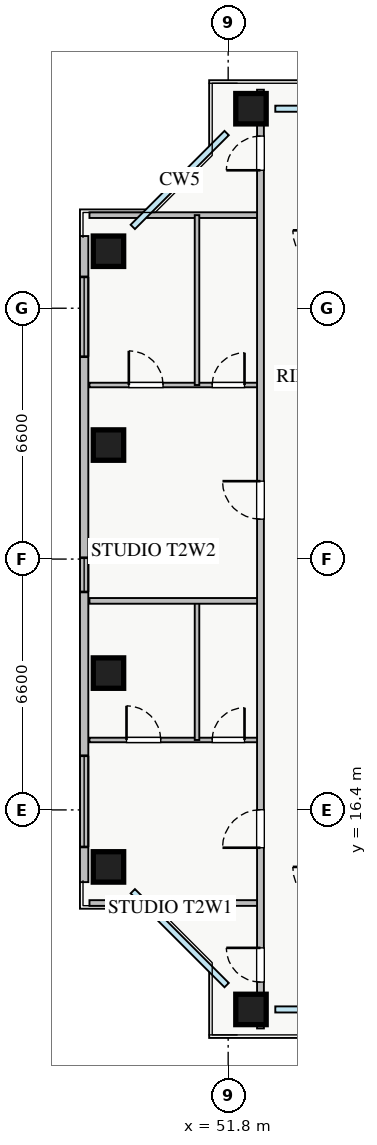
"""IFC4 building model, lengths in metres.
Left out: names, types, materials, properties, quantities, classifications, styles, units other than length and angle.
Written with IfcOpenShell. Run it as: python <this file> out.ifc"""

import sys

from ifc_helpers import new_model, si_unit, direction, frame, frame_2d, origin, origin_2d, place, context, subcontext, project, spatial, rectangle, extrude, source, transform, mapped, element, fill, save


model = new_model("IFC4")
c1 = context("Model", 3, precision=1e-05, world=origin(), true_north=direction((0.0, 1.0)))
c2 = subcontext(c1, "Body", "Model", "MODEL_VIEW")
j1 = project(units=[si_unit("LENGTHUNIT", "METRE"), si_unit("PLANEANGLEUNIT", "RADIAN")], contexts=[c1])
p1 = place(None, origin())
s1 = spatial("IfcSite", under=j1, at=p1, CompositionType="ELEMENT")
p2 = place(p1, origin())
s2 = spatial("IfcBuilding", under=s1, at=p2, CompositionType="ELEMENT")
p3 = place(p2, frame((0.0, 0.0, 106.75)))
s3 = spatial("IfcBuildingStorey", under=s2, at=p3, CompositionType="ELEMENT", Elevation=106.75)
m1 = source(origin(), c2, "Body", "SweptSolid", [
    extrude(rectangle(XDim=0.8, YDim=0.8, at=origin_2d()), origin(), (0.0, 0.0, 1.0), 3.25),
])
for number, where, z_axis, x_axis in (
    (1, (52.4, 11.15, 0.0), (0.0, 0.0, 1.0), (1.0, 0.0, 0.0)),
    (2, (52.4, 34.85, 0.0), (0.0, 0.0, 1.0), (1.0, 0.0, 0.0)),
    (3, (48.65, 14.9, 0.0), (0.0, 0.0, 1.0), (1.0, 0.0, 0.0)),
    (4, (48.65, 20.0, 0.0), (0.0, 0.0, 1.0), (1.0, 0.0, 0.0)),
    (5, (48.65, 26.0, 0.0), (0.0, 0.0, 1.0), (1.0, 0.0, 0.0)),
    (6, (48.65, 31.1, 0.0), (0.0, 0.0, 1.0), (1.0, 0.0, 0.0)),
):
    element("IfcColumn", number, at=place(p3, frame(where, z_axis=z_axis, x_axis=x_axis)), inside=s3, PredefinedType="COLUMN", context=c2, shape_type="MappedRepresentation", body=[
        mapped(m1, transform((0.0, 0.0, 0.0), x_axis=(1.0, 0.0, 0.0), y_axis=(0.0, 1.0, 0.0), z_axis=(0.0, 0.0, 1.0), scale=1.0)),
    ])
p4 = place(p3, frame((48.01, 14.5, 0.0), z_axis=(0.0, 0.0, 1.0), x_axis=(0.0, 1.0, 0.0)))
e7 = element("IfcWall", 7, at=p4, inside=s3, PredefinedType="STANDARD", context=c2, shape_type="SweptSolid", body=[
    extrude(rectangle(XDim=17.0, YDim=0.22, at=frame_2d((8.5, 0.0))), origin(), (0.0, 0.0, 1.0), 2.61),
])
p5 = place(p4, frame((0.925, 0.0, 0.9)))
e8 = element("IfcOpeningElement", 8, at=p5, cuts=e7, PredefinedType="OPENING", context=c2, shape_type="SweptSolid", body=[
    extrude(rectangle(XDim=2.4, YDim=1.48, at=frame_2d((1.2, 0.74))), frame((0.0, 0.12, 0.0), z_axis=(0.0, -1.0, 0.0), x_axis=(1.0, 0.0, 0.0)), (0.0, 0.0, 1.0), 0.24),
])
p6 = place(p4, frame((13.825, 0.0, 0.9)))
e9 = element("IfcOpeningElement", 9, at=p6, cuts=e7, PredefinedType="OPENING", context=c2, shape_type="SweptSolid", body=[
    extrude(rectangle(XDim=2.1, YDim=1.48, at=frame_2d((1.05, 0.74))), frame((0.0, 0.12, 0.0), z_axis=(0.0, -1.0, 0.0), x_axis=(1.0, 0.0, 0.0)), (0.0, 0.0, 1.0), 0.24),
])
p7 = place(p4, frame((7.635, 0.0, 0.9)))
e10 = element("IfcOpeningElement", 10, at=p7, cuts=e7, PredefinedType="OPENING", context=c2, shape_type="SweptSolid", body=[
    extrude(rectangle(XDim=0.9, YDim=1.2, at=frame_2d((0.45, 0.6))), frame((0.0, 0.12, 0.0), z_axis=(0.0, -1.0, 0.0), x_axis=(1.0, 0.0, 0.0)), (0.0, 0.0, 1.0), 0.24),
])
for number, where, z_axis, x_axis in (
    (11, (48.15, 32.05, 0.0), (0.0, 0.0, 1.0), (1.0, 0.0, 0.0)),
    (12, (48.15, 13.95, 0.0), (0.0, 0.0, 1.0), (1.0, 0.0, 0.0)),
):
    element("IfcWall", number, at=place(p3, frame(where, z_axis=z_axis, x_axis=x_axis)), inside=s3, PredefinedType="PARTITIONING", context=c2, shape_type="SweptSolid", body=[
        extrude(rectangle(XDim=4.5, YDim=0.15, at=frame_2d((2.25, 0.0))), origin(), (0.0, 0.0, 1.0), 3.07),
    ])
p8 = place(p3, frame((48.15, 18.24, 0.0), z_axis=(0.0, 0.0, 1.0), x_axis=(1.0, 0.0, 0.0)))
e13 = element("IfcWall", 13, at=p8, inside=s3, PredefinedType="PLUMBINGWALL", context=c2, shape_type="SweptSolid", body=[
    extrude(rectangle(XDim=4.5, YDim=0.12, at=frame_2d((2.25, 0.0))), origin(), (0.0, 0.0, 1.0), 3.07),
])
p9 = place(p8, frame((0.975, 0.0, 0.0)))
e14 = element("IfcOpeningElement", 14, at=p9, cuts=e13, PredefinedType="OPENING", context=c2, shape_type="SweptSolid", body=[
    extrude(rectangle(XDim=0.9, YDim=2.05, at=frame_2d((0.45, 1.025))), frame((0.0, 0.07, 0.0), z_axis=(0.0, -1.0, 0.0), x_axis=(1.0, 0.0, 0.0)), (0.0, 0.0, 1.0), 0.14),
])
p10 = place(p8, frame((3.23, 0.0, 0.0)))
e15 = element("IfcOpeningElement", 15, at=p10, cuts=e13, PredefinedType="OPENING", context=c2, shape_type="SweptSolid", body=[
    extrude(rectangle(XDim=0.85, YDim=2.05, at=frame_2d((0.425, 1.025))), frame((0.0, 0.07, 0.0), z_axis=(0.0, -1.0, 0.0), x_axis=(1.0, 0.0, 0.0)), (0.0, 0.0, 1.0), 0.14),
])
p11 = place(p3, frame((50.98, 18.24, 0.0), z_axis=(0.0, 0.0, 1.0), x_axis=(0.0, 1.0, 0.0)))
e16 = element("IfcWall", 16, at=p11, inside=s3, PredefinedType="PLUMBINGWALL", context=c2, shape_type="SweptSolid", body=[
    extrude(rectangle(XDim=3.66, YDim=0.12, at=frame_2d((1.83, 0.0))), origin(), (0.0, 0.0, 1.0), 3.07),
])
p12 = place(p3, frame((48.15, 27.58, 0.0), z_axis=(0.0, 0.0, 1.0), x_axis=(1.0, 0.0, 0.0)))
e17 = element("IfcWall", 17, at=p12, inside=s3, PredefinedType="PLUMBINGWALL", context=c2, shape_type="SweptSolid", body=[
    extrude(rectangle(XDim=4.5, YDim=0.12, at=frame_2d((2.25, 0.0))), origin(), (0.0, 0.0, 1.0), 2.815),
])
p13 = place(p12, frame((1.036, 0.0, 0.0)))
e18 = element("IfcOpeningElement", 18, at=p13, cuts=e17, PredefinedType="OPENING", context=c2, shape_type="SweptSolid", body=[
    extrude(rectangle(XDim=0.9, YDim=2.05, at=frame_2d((0.45, 1.025))), frame((0.0, 0.07, 0.0), z_axis=(0.0, -1.0, 0.0), x_axis=(1.0, 0.0, 0.0)), (0.0, 0.0, 1.0), 0.14),
])
p14 = place(p12, frame((3.23, 0.0, 0.0)))
e19 = element("IfcOpeningElement", 19, at=p14, cuts=e17, PredefinedType="OPENING", context=c2, shape_type="SweptSolid", body=[
    extrude(rectangle(XDim=0.85, YDim=2.05, at=frame_2d((0.425, 1.025))), frame((0.0, 0.07, 0.0), z_axis=(0.0, -1.0, 0.0), x_axis=(1.0, 0.0, 0.0)), (0.0, 0.0, 1.0), 0.14),
])
p15 = place(p3, frame((50.98, 27.58, 0.0), z_axis=(0.0, 0.0, 1.0), x_axis=(0.0, 1.0, 0.0)))
e20 = element("IfcWall", 20, at=p15, inside=s3, PredefinedType="PLUMBINGWALL", context=c2, shape_type="SweptSolid", body=[
    extrude(rectangle(XDim=4.47, YDim=0.12, at=frame_2d((2.235, 0.0))), origin(), (0.0, 0.0, 1.0), 3.07),
])
p16 = place(p3, frame((48.15, 21.9, 0.0), z_axis=(0.0, 0.0, 1.0), x_axis=(1.0, 0.0, 0.0)))
e21 = element("IfcWall", 21, at=p16, inside=s3, PredefinedType="PARTITIONING", context=c2, shape_type="SweptSolid", body=[
    extrude(rectangle(XDim=4.5, YDim=0.15, at=frame_2d((2.25, 0.0))), origin(), (0.0, 0.0, 1.0), 3.07),
])
p17 = place(p3, frame((52.65, 10.65, 0.0), z_axis=(0.0, 0.0, 1.0), x_axis=(0.0, 1.0, 0.0)))
e22 = element("IfcWall", 22, at=p17, inside=s3, PredefinedType="PARTITIONING", context=c2, shape_type="SweptSolid", body=[
    extrude(rectangle(XDim=24.7, YDim=0.18, at=frame_2d((12.35, 0.0))), origin(), (0.0, 0.0, 1.0), 2.615),
])
p18 = place(p17, frame((22.58, 0.0, 0.0)))
e23 = element("IfcOpeningElement", 23, at=p18, cuts=e22, PredefinedType="OPENING", context=c2, shape_type="SweptSolid", body=[
    extrude(rectangle(XDim=0.9, YDim=2.05, at=frame_2d((0.45, 1.025))), frame((0.0, 0.1, 0.0), z_axis=(0.0, -1.0, 0.0), x_axis=(1.0, 0.0, 0.0)), (0.0, 0.0, 1.0), 0.2),
])
p19 = place(p17, frame((1.22, 0.0, 0.0)))
e24 = element("IfcOpeningElement", 24, at=p19, cuts=e22, PredefinedType="OPENING", context=c2, shape_type="SweptSolid", body=[
    extrude(rectangle(XDim=0.9, YDim=2.05, at=frame_2d((0.45, 1.025))), frame((0.0, 0.1, 0.0), z_axis=(0.0, -1.0, 0.0), x_axis=(1.0, 0.0, 0.0)), (0.0, 0.0, 1.0), 0.2),
])
p20 = place(p17, frame((4.755, 0.0, 0.0)))
e25 = element("IfcOpeningElement", 25, at=p20, cuts=e22, PredefinedType="OPENING", context=c2, shape_type="SweptSolid", body=[
    extrude(rectangle(XDim=1.0, YDim=2.05, at=frame_2d((0.5, 1.025))), frame((0.0, 0.1, 0.0), z_axis=(0.0, -1.0, 0.0), x_axis=(1.0, 0.0, 0.0)), (0.0, 0.0, 1.0), 0.2),
])
p21 = place(p17, frame((13.4, 0.0, 0.0)))
e26 = element("IfcOpeningElement", 26, at=p21, cuts=e22, PredefinedType="OPENING", context=c2, shape_type="SweptSolid", body=[
    extrude(rectangle(XDim=1.0, YDim=2.05, at=frame_2d((0.5, 1.025))), frame((0.0, 0.1, 0.0), z_axis=(0.0, -1.0, 0.0), x_axis=(1.0, 0.0, 0.0)), (0.0, 0.0, 1.0), 0.2),
])
m2 = source(origin(), c2, "Body", "SweptSolid", [
    extrude(rectangle(XDim=2.4, YDim=1.48, at=frame_2d((1.2, 0.74))), frame((0.0, 0.03, 0.0), z_axis=(0.0, -1.0, 0.0), x_axis=(1.0, 0.0, 0.0)), (0.0, 0.0, 1.0), 0.06),
])
p22 = place(p5, origin())
e27 = element("IfcWindow", 27, at=p22, inside=s3, PartitioningType="TRIPLE_PANEL_VERTICAL", PredefinedType="WINDOW", context=c2, shape_type="MappedRepresentation", body=[
    mapped(m2, transform((0.0, 0.0, 0.0), x_axis=(1.0, 0.0, 0.0), y_axis=(0.0, 1.0, 0.0), z_axis=(0.0, 0.0, 1.0), scale=1.0)),
])
fill(e8, e27)
m3 = source(origin(), c2, "Body", "SweptSolid", [
    extrude(rectangle(XDim=2.1, YDim=1.48, at=frame_2d((1.05, 0.74))), frame((0.0, 0.03, 0.0), z_axis=(0.0, -1.0, 0.0), x_axis=(1.0, 0.0, 0.0)), (0.0, 0.0, 1.0), 0.06),
])
p23 = place(p6, origin())
e28 = element("IfcWindow", 28, at=p23, inside=s3, PartitioningType="TRIPLE_PANEL_VERTICAL", PredefinedType="WINDOW", context=c2, shape_type="MappedRepresentation", body=[
    mapped(m3, transform((0.0, 0.0, 0.0), x_axis=(1.0, 0.0, 0.0), y_axis=(0.0, 1.0, 0.0), z_axis=(0.0, 0.0, 1.0), scale=1.0)),
])
fill(e9, e28)
m4 = source(origin(), c2, "Body", "SweptSolid", [
    extrude(rectangle(XDim=0.9, YDim=2.05, at=frame_2d((0.45, 1.025))), frame((0.0, 0.025, 0.0), z_axis=(0.0, -1.0, 0.0), x_axis=(1.0, 0.0, 0.0)), (0.0, 0.0, 1.0), 0.05),
])
p24 = place(p9, origin())
e29 = element("IfcDoor", 29, at=p24, inside=s3, OperationType="SINGLE_SWING_LEFT", PredefinedType="DOOR", context=c2, shape_type="MappedRepresentation", body=[
    mapped(m4, transform((0.0, 0.0, 0.0), x_axis=(1.0, 0.0, 0.0), y_axis=(0.0, 1.0, 0.0), z_axis=(0.0, 0.0, 1.0), scale=1.0)),
])
fill(e14, e29)
m5 = source(origin(), c2, "Body", "SweptSolid", [
    extrude(rectangle(XDim=0.85, YDim=2.05, at=frame_2d((0.425, 1.025))), frame((0.0, 0.025, 0.0), z_axis=(0.0, -1.0, 0.0), x_axis=(1.0, 0.0, 0.0)), (0.0, 0.0, 1.0), 0.05),
])
p25 = place(p10, origin())
e30 = element("IfcDoor", 30, at=p25, inside=s3, OperationType="SINGLE_SWING_RIGHT", PredefinedType="DOOR", context=c2, shape_type="MappedRepresentation", body=[
    mapped(m5, transform((0.0, 0.0, 0.0), x_axis=(1.0, 0.0, 0.0), y_axis=(0.0, 1.0, 0.0), z_axis=(0.0, 0.0, 1.0), scale=1.0)),
])
fill(e15, e30)
p26 = place(p13, origin())
e31 = element("IfcDoor", 31, at=p26, inside=s3, OperationType="SINGLE_SWING_LEFT", PredefinedType="DOOR", context=c2, shape_type="MappedRepresentation", body=[
    mapped(m4, transform((0.0, 0.0, 0.0), x_axis=(1.0, 0.0, 0.0), y_axis=(0.0, 1.0, 0.0), z_axis=(0.0, 0.0, 1.0), scale=1.0)),
])
fill(e18, e31)
p27 = place(p14, origin())
e32 = element("IfcDoor", 32, at=p27, inside=s3, OperationType="SINGLE_SWING_RIGHT", PredefinedType="DOOR", context=c2, shape_type="MappedRepresentation", body=[
    mapped(m5, transform((0.0, 0.0, 0.0), x_axis=(1.0, 0.0, 0.0), y_axis=(0.0, 1.0, 0.0), z_axis=(0.0, 0.0, 1.0), scale=1.0)),
])
fill(e19, e32)
p28 = place(p18, origin())
e33 = element("IfcDoor", 33, at=p28, inside=s3, OperationType="SINGLE_SWING_LEFT", PredefinedType="DOOR", context=c2, shape_type="MappedRepresentation", body=[
    mapped(m4, transform((0.0, 0.0, 0.0), x_axis=(1.0, 0.0, 0.0), y_axis=(0.0, 1.0, 0.0), z_axis=(0.0, 0.0, 1.0), scale=1.0)),
])
fill(e23, e33)
p29 = place(p19, origin())
e34 = element("IfcDoor", 34, at=p29, inside=s3, OperationType="SINGLE_SWING_RIGHT", PredefinedType="DOOR", context=c2, shape_type="MappedRepresentation", body=[
    mapped(m4, transform((0.0, 0.0, 0.0), x_axis=(1.0, 0.0, 0.0), y_axis=(0.0, 1.0, 0.0), z_axis=(0.0, 0.0, 1.0), scale=1.0)),
])
fill(e24, e34)
m6 = source(origin(), c2, "Body", "SweptSolid", [
    extrude(rectangle(XDim=1.0, YDim=2.05, at=frame_2d((0.5, 1.025))), frame((0.0, 0.025, 0.0), z_axis=(0.0, -1.0, 0.0), x_axis=(1.0, 0.0, 0.0)), (0.0, 0.0, 1.0), 0.05),
])
p30 = place(p20, origin())
e35 = element("IfcDoor", 35, at=p30, inside=s3, OperationType="SINGLE_SWING_LEFT", PredefinedType="DOOR", context=c2, shape_type="MappedRepresentation", body=[
    mapped(m6, transform((0.0, 0.0, 0.0), x_axis=(1.0, 0.0, 0.0), y_axis=(0.0, 1.0, 0.0), z_axis=(0.0, 0.0, 1.0), scale=1.0)),
])
fill(e25, e35)
p31 = place(p21, origin())
e36 = element("IfcDoor", 36, at=p31, inside=s3, OperationType="SINGLE_SWING_RIGHT", PredefinedType="DOOR", context=c2, shape_type="MappedRepresentation", body=[
    mapped(m6, transform((0.0, 0.0, 0.0), x_axis=(1.0, 0.0, 0.0), y_axis=(0.0, 1.0, 0.0), z_axis=(0.0, 0.0, 1.0), scale=1.0)),
])
fill(e26, e36)
m7 = source(origin(), c2, "Body", "SweptSolid", [
    extrude(rectangle(XDim=0.9, YDim=1.2, at=frame_2d((0.45, 0.6))), frame((0.0, 0.03, 0.0), z_axis=(0.0, -1.0, 0.0), x_axis=(1.0, 0.0, 0.0)), (0.0, 0.0, 1.0), 0.06),
])
p32 = place(p7, origin())
e37 = element("IfcWindow", 37, at=p32, inside=s3, PartitioningType="SINGLE_PANEL", PredefinedType="WINDOW", context=c2, shape_type="MappedRepresentation", body=[
    mapped(m7, transform((0.0, 0.0, 0.0), x_axis=(1.0, 0.0, 0.0), y_axis=(0.0, 1.0, 0.0), z_axis=(0.0, 0.0, 1.0), scale=1.0)),
])
fill(e10, e37)
save(model, sys.argv[1])
